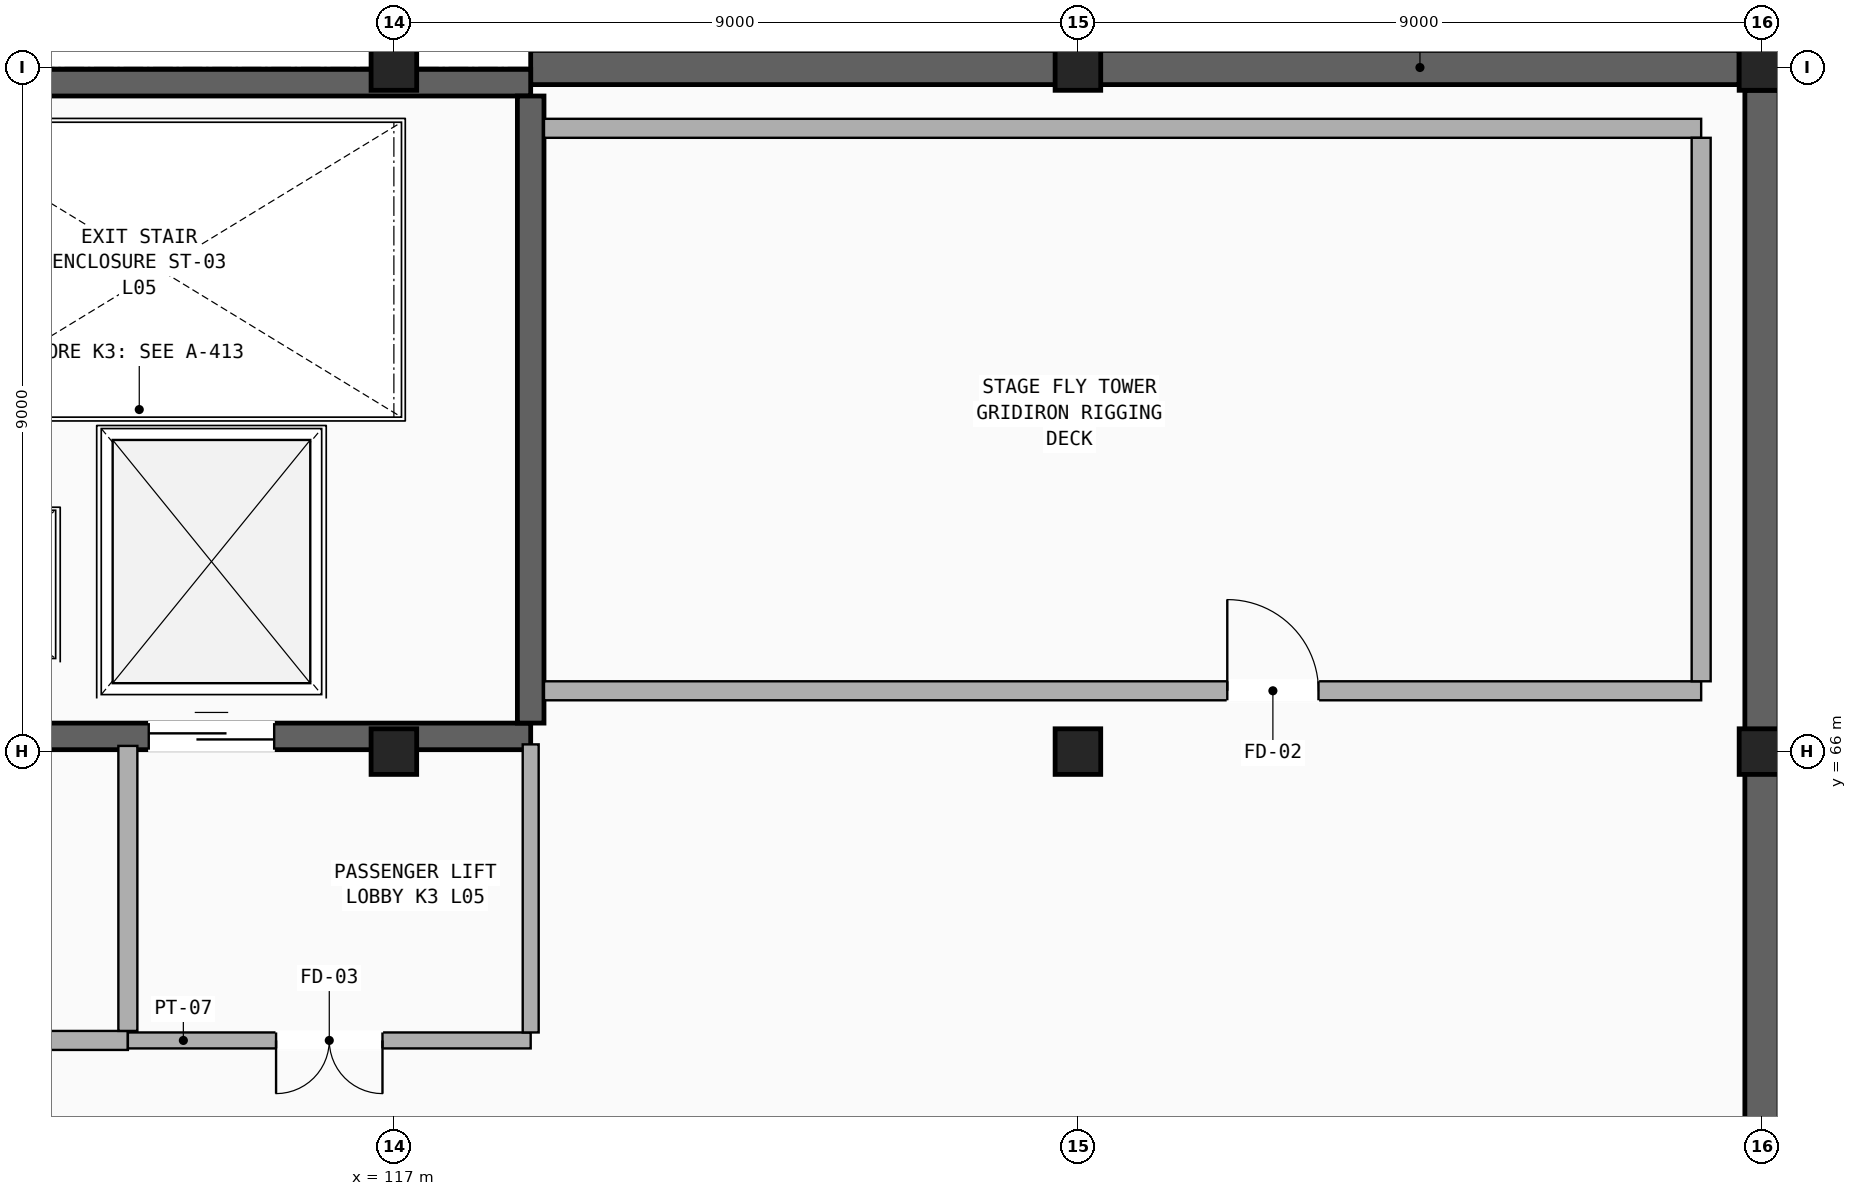
"""IFC4 building model, lengths in metres.
Left out: names, types, materials, properties, quantities, classifications, styles, units other than length and angle.
Written with IfcOpenShell. Run it as: python <this file> out.ifc"""

import sys

from ifc_helpers import new_model, si_unit, direction, frame, frame_2d, origin, origin_2d, place, context, subcontext, project, spatial, polyline, rectangle, outline, extrude, element, fill, save


model = new_model("IFC4")
c1 = context("Model", 3, precision=1e-05, world=origin(), true_north=direction((0.0, 1.0)))
c2 = subcontext(c1, "Body", "Model", "MODEL_VIEW")
j1 = project(units=[si_unit("LENGTHUNIT", "METRE"), si_unit("PLANEANGLEUNIT", "RADIAN")], contexts=[c1])
p1 = place(None, origin())
s1 = spatial("IfcSite", under=j1, at=p1, CompositionType="ELEMENT")
p2 = place(p1, origin())
s2 = spatial("IfcBuilding", under=s1, at=p2, CompositionType="ELEMENT")
p3 = place(p2, frame((0.0, 0.0, 21.76)))
s3 = spatial("IfcBuildingStorey", under=s2, at=p3, CompositionType="ELEMENT", Elevation=21.76)
for number, where, z_axis, x_axis in (
    (1, (117.0, 66.0, 0.0), (0.0, 0.0, 1.0), (1.0, 0.0, 0.0)),
    (2, (117.0, 75.0, 0.0), (0.0, 0.0, 1.0), (1.0, 0.0, 0.0)),
):
    element("IfcColumn", number, at=place(p3, frame(where, z_axis=z_axis, x_axis=x_axis)), inside=s3, PredefinedType="COLUMN", context=c2, shape_type="SweptSolid", body=[
        extrude(rectangle(XDim=0.6, YDim=0.6, at=origin_2d()), origin(), (0.0, 0.0, 1.0), 9.0),
    ])
for number, where, z_axis, x_axis in (
    (3, (126.0, 66.0, 0.0), (0.0, 0.0, 1.0), (1.0, 0.0, 0.0)),
    (4, (126.0, 75.0, 0.0), (0.0, 0.0, 1.0), (1.0, 0.0, 0.0)),
):
    element("IfcColumn", number, at=place(p3, frame(where, z_axis=z_axis, x_axis=x_axis)), inside=s3, PredefinedType="COLUMN", context=c2, shape_type="SweptSolid", body=[
        extrude(rectangle(XDim=0.6, YDim=0.6, at=origin_2d()), origin(), (0.0, 0.0, 1.0), 8.602),
    ])
for number, where, z_axis, x_axis in (
    (5, (135.0, 66.0, 0.0), (0.0, 0.0, 1.0), (1.0, 0.0, 0.0)),
    (6, (135.0, 75.0, 0.0), (0.0, 0.0, 1.0), (1.0, 0.0, 0.0)),
):
    element("IfcColumn", number, at=place(p3, frame(where, z_axis=z_axis, x_axis=x_axis)), inside=s3, PredefinedType="COLUMN", context=c2, shape_type="SweptSolid", body=[
        extrude(rectangle(XDim=0.6, YDim=0.6, at=origin_2d()), origin(), (0.0, 0.0, 1.0), 7.129),
    ])
p4 = place(p3, frame((118.8, 75.0, 0.0), z_axis=(0.0, 0.0, 1.0), x_axis=(1.0, 0.0, 0.0)))
e7 = element("IfcWall", 7, at=p4, inside=s3, PredefinedType="SHEAR", context=c2, shape_type="SweptSolid", body=[
    extrude(outline(polyline([(0.0, 0.0), (15.9, 0.0), (15.9, 6.998), (0.0, 9.6), (0.0, 0.0)])), frame((0.0, 0.225, 0.0), z_axis=(0.0, -1.0, 0.0), x_axis=(1.0, 0.0, 0.0)), (0.0, 0.0, 1.0), 0.45),
])
p5 = place(p3, frame((135.0, 37.3, 0.0), z_axis=(0.0, 0.0, 1.0), x_axis=(0.0, 1.0, 0.0)))
e8 = element("IfcWall", 8, at=p5, inside=s3, PredefinedType="SHEAR", context=c2, shape_type="SweptSolid", body=[
    extrude(rectangle(XDim=37.4, YDim=0.45, at=frame_2d((18.7, 0.0))), origin(), (0.0, 0.0, 1.0), 6.949),
])
p6 = place(p3, frame((108.5, 66.2, 0.0), z_axis=(0.0, 0.0, 1.0), x_axis=(1.0, 0.0, 0.0)))
e9 = element("IfcWall", 9, at=p6, inside=s3, PredefinedType="SHEAR", context=c2, shape_type="SweptSolid", body=[
    extrude(rectangle(XDim=10.3, YDim=0.35, at=frame_2d((5.15, 0.0))), origin(), (0.0, 0.0, 1.0), 9.78),
])
p7 = place(p6, frame((0.45, 0.0, 0.0)))
e10 = element("IfcOpeningElement", 10, at=p7, cuts=e9, PredefinedType="OPENING", context=c2, shape_type="SweptSolid", body=[
    extrude(rectangle(XDim=1.1, YDim=2.2, at=frame_2d((0.55, 1.1))), frame((0.0, 0.185, 0.0), z_axis=(0.0, -1.0, 0.0), x_axis=(1.0, 0.0, 0.0)), (0.0, 0.0, 1.0), 0.37),
])
p8 = place(p6, frame((2.09, 0.0, 0.0)))
e11 = element("IfcOpeningElement", 11, at=p8, cuts=e9, PredefinedType="OPENING", context=c2, shape_type="SweptSolid", body=[
    extrude(rectangle(XDim=1.22, YDim=2.2, at=frame_2d((0.61, 1.1))), frame((0.0, 0.185, 0.0), z_axis=(0.0, -1.0, 0.0), x_axis=(1.0, 0.0, 0.0)), (0.0, 0.0, 1.0), 0.37),
])
p9 = place(p6, frame((5.275, 0.0, 0.0)))
e12 = element("IfcOpeningElement", 12, at=p9, cuts=e9, PredefinedType="OPENING", context=c2, shape_type="SweptSolid", body=[
    extrude(rectangle(XDim=1.65, YDim=2.34, at=frame_2d((0.825, 1.17))), frame((0.0, 0.185, 0.0), z_axis=(0.0, -1.0, 0.0), x_axis=(1.0, 0.0, 0.0)), (0.0, 0.0, 1.0), 0.37),
])
p10 = place(p3, frame((108.5, 74.8, 0.0), z_axis=(0.0, 0.0, 1.0), x_axis=(1.0, 0.0, 0.0)))
e13 = element("IfcWall", 13, at=p10, inside=s3, PredefinedType="SHEAR", context=c2, shape_type="SweptSolid", body=[
    extrude(rectangle(XDim=10.3, YDim=0.35, at=frame_2d((5.15, 0.0))), origin(), (0.0, 0.0, 1.0), 9.78),
])
p11 = place(p3, frame((118.8, 66.375, 0.0), z_axis=(0.0, 0.0, 1.0), x_axis=(0.0, 1.0, 0.0)))
e14 = element("IfcWall", 14, at=p11, inside=s3, PredefinedType="SHEAR", context=c2, shape_type="SweptSolid", body=[
    extrude(rectangle(XDim=8.25, YDim=0.35, at=frame_2d((4.125, 0.0))), origin(), (0.0, 0.0, 1.0), 9.78),
])
p12 = place(p3, frame((108.5, 62.2, 0.0), z_axis=(0.0, 0.0, 1.0), x_axis=(1.0, 0.0, 0.0)))
e15 = element("IfcWall", 15, at=p12, inside=s3, PredefinedType="PARTITIONING", context=c2, shape_type="SweptSolid", body=[
    extrude(rectangle(XDim=5.0, YDim=0.25, at=frame_2d((2.5, 0.0))), origin(), (0.0, 0.0, 1.0), 8.78),
])
p13 = place(p12, frame((1.95, 0.0, 0.0)))
e16 = element("IfcOpeningElement", 16, at=p13, cuts=e15, PredefinedType="OPENING", context=c2, shape_type="SweptSolid", body=[
    extrude(rectangle(XDim=1.1, YDim=2.2, at=frame_2d((0.55, 1.1))), frame((0.0, 0.135, 0.0), z_axis=(0.0, -1.0, 0.0), x_axis=(1.0, 0.0, 0.0)), (0.0, 0.0, 1.0), 0.27),
])
p14 = place(p3, frame((113.5, 62.325, 0.0), z_axis=(0.0, 0.0, 1.0), x_axis=(0.0, 1.0, 0.0)))
e17 = element("IfcWall", 17, at=p14, inside=s3, PredefinedType="PARTITIONING", context=c2, shape_type="SweptSolid", body=[
    extrude(rectangle(XDim=3.75, YDim=0.25, at=frame_2d((1.875, 0.0))), origin(), (0.0, 0.0, 1.0), 8.78),
])
p15 = place(p3, frame((113.5, 62.2, 0.0), z_axis=(0.0, 0.0, 1.0), x_axis=(1.0, 0.0, 0.0)))
e18 = element("IfcWall", 18, at=p15, inside=s3, PredefinedType="PARTITIONING", context=c2, shape_type="SweptSolid", body=[
    extrude(rectangle(XDim=5.3, YDim=0.21, at=frame_2d((2.65, 0.0))), origin(), (0.0, 0.0, 1.0), 6.447),
])
p16 = place(p15, frame((1.95, 0.0, 0.0)))
e19 = element("IfcOpeningElement", 19, at=p16, cuts=e18, PredefinedType="OPENING", context=c2, shape_type="SweptSolid", body=[
    extrude(rectangle(XDim=1.4, YDim=2.2, at=frame_2d((0.7, 1.1))), frame((0.0, 0.115, 0.0), z_axis=(0.0, -1.0, 0.0), x_axis=(1.0, 0.0, 0.0)), (0.0, 0.0, 1.0), 0.23),
])
p17 = place(p3, frame((118.8, 62.305, 0.0), z_axis=(0.0, 0.0, 1.0), x_axis=(0.0, 1.0, 0.0)))
e20 = element("IfcWall", 20, at=p17, inside=s3, PredefinedType="PARTITIONING", context=c2, shape_type="SweptSolid", body=[
    extrude(rectangle(XDim=3.79, YDim=0.21, at=frame_2d((1.895, 0.0))), origin(), (0.0, 0.0, 1.0), 8.78),
])
p18 = place(p3, frame((118.975, 66.8, 0.0), z_axis=(0.0, 0.0, 1.0), x_axis=(1.0, 0.0, 0.0)))
e21 = element("IfcWall", 21, at=p18, inside=s3, PredefinedType="PARTITIONING", context=c2, shape_type="SweptSolid", body=[
    extrude(rectangle(XDim=15.225, YDim=0.25, at=frame_2d((7.612, 0.0))), origin(), (0.0, 0.0, 1.0), 4.974),
])
p19 = place(p18, frame((8.99, 0.0, 0.0)))
e22 = element("IfcOpeningElement", 22, at=p19, cuts=e21, PredefinedType="OPENING", context=c2, shape_type="SweptSolid", body=[
    extrude(rectangle(XDim=1.2, YDim=2.2, at=frame_2d((0.6, 1.1))), frame((0.0, 0.135, 0.0), z_axis=(0.0, -1.0, 0.0), x_axis=(1.0, 0.0, 0.0)), (0.0, 0.0, 1.0), 0.27),
])
p20 = place(p3, frame((118.975, 74.2, 0.0), z_axis=(0.0, 0.0, 1.0), x_axis=(1.0, 0.0, 0.0)))
e23 = element("IfcWall", 23, at=p20, inside=s3, PredefinedType="PARTITIONING", context=c2, shape_type="SweptSolid", body=[
    extrude(rectangle(XDim=15.225, YDim=0.25, at=frame_2d((7.612, 0.0))), origin(), (0.0, 0.0, 1.0), 4.974),
])
p21 = place(p3, frame((134.2, 66.925, 0.0), z_axis=(0.0, 0.0, 1.0), x_axis=(0.0, 1.0, 0.0)))
e24 = element("IfcWall", 24, at=p21, inside=s3, PredefinedType="PARTITIONING", context=c2, shape_type="SweptSolid", body=[
    extrude(rectangle(XDim=7.15, YDim=0.25, at=frame_2d((3.575, 0.0))), origin(), (0.0, 0.0, 1.0), 7.08),
])
p22 = place(p9, origin())
e25 = element("IfcDoor", 25, at=p22, inside=s3, OperationType="SLIDING_TO_LEFT", PredefinedType="DOOR", context=c2, shape_type="SweptSolid", body=[
    extrude(rectangle(XDim=1.65, YDim=2.34, at=frame_2d((0.825, 1.17))), frame((0.0, 0.025, 0.0), z_axis=(0.0, -1.0, 0.0), x_axis=(1.0, 0.0, 0.0)), (0.0, 0.0, 1.0), 0.05),
])
fill(e12, e25)
p23 = place(p16, frame((1.4, 0.0, 0.0), z_axis=(0.0, 0.0, 1.0), x_axis=(-1.0, 0.0, 0.0)))
e26 = element("IfcDoor", 26, at=p23, inside=s3, OperationType="DOUBLE_DOOR_SINGLE_SWING", PredefinedType="DOOR", context=c2, shape_type="SweptSolid", body=[
    extrude(rectangle(XDim=1.4, YDim=2.2, at=frame_2d((0.7, 1.1))), frame((0.0, 0.025, 0.0), z_axis=(0.0, -1.0, 0.0), x_axis=(1.0, 0.0, 0.0)), (0.0, 0.0, 1.0), 0.05),
])
fill(e19, e26)
p24 = place(p19, origin())
e27 = element("IfcDoor", 27, at=p24, inside=s3, OperationType="SINGLE_SWING_LEFT", PredefinedType="DOOR", context=c2, shape_type="SweptSolid", body=[
    extrude(rectangle(XDim=1.2, YDim=2.2, at=frame_2d((0.6, 1.1))), frame((0.0, 0.025, 0.0), z_axis=(0.0, -1.0, 0.0), x_axis=(1.0, 0.0, 0.0)), (0.0, 0.0, 1.0), 0.05),
])
fill(e22, e27)
save(model, sys.argv[1])
